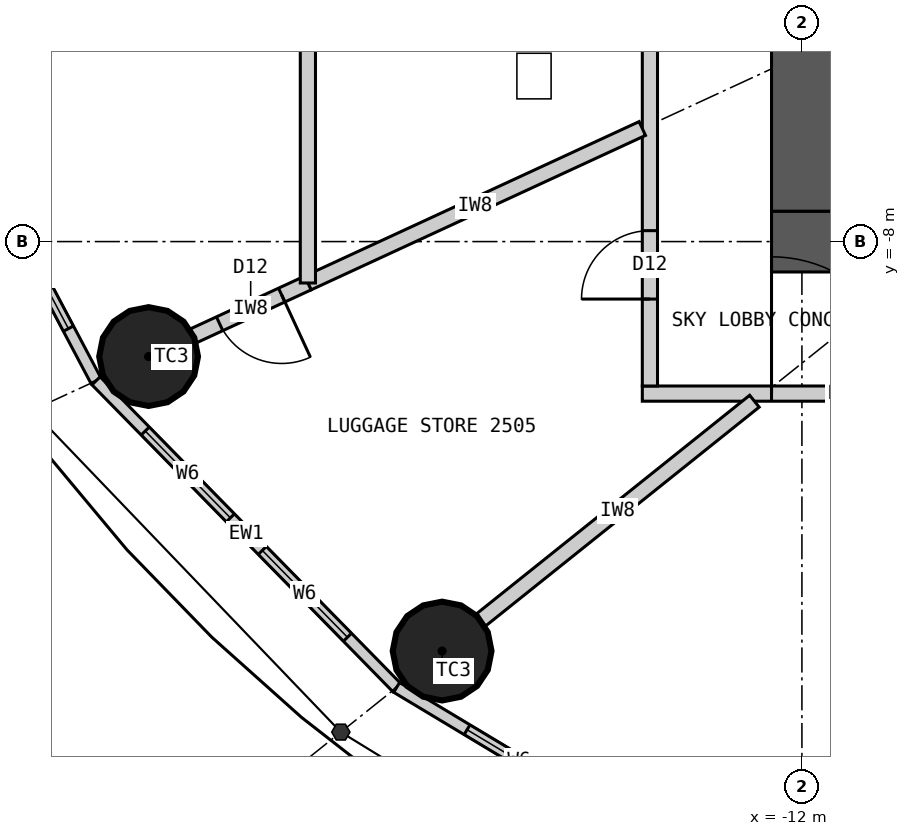
"""IFC4 building model, lengths in metres.
Left out: names, types, materials, properties, quantities, classifications, styles, units other than length and angle.
Written with IfcOpenShell. Run it as: python <this file> out.ifc"""

import sys

from ifc_helpers import new_model, si_unit, direction, frame, frame_2d, origin, origin_2d, place, context, subcontext, project, spatial, rectangle, circle, extrude, element, fill, save


model = new_model("IFC4")
c1 = context("Model", 3, precision=1e-05, world=origin(), true_north=direction((0.0, 1.0)))
c2 = subcontext(c1, "Body", "Model", "MODEL_VIEW")
j1 = project(units=[si_unit("LENGTHUNIT", "METRE"), si_unit("PLANEANGLEUNIT", "RADIAN")], contexts=[c1])
p1 = place(None, origin())
s1 = spatial("IfcSite", under=j1, at=p1, CompositionType="ELEMENT")
p2 = place(p1, origin())
s2 = spatial("IfcBuilding", under=s1, at=p2, CompositionType="ELEMENT")
p3 = place(p2, frame((0.0, 0.0, 100.2)))
s3 = spatial("IfcBuildingStorey", under=s2, at=p3, CompositionType="ELEMENT", Elevation=100.2)
for number, where, z_axis, x_axis in (
    (1, (-20.596, -9.513, 0.0), (0.0, 0.0, 1.0), (1.0, 0.0, 0.0)),
    (2, (-16.734, -13.387, 0.0), (0.0, 0.0, 1.0), (1.0, 0.0, 0.0)),
):
    element("IfcColumn", number, at=place(p3, frame(where, z_axis=z_axis, x_axis=x_axis)), inside=s3, PredefinedType="COLUMN", context=c2, shape_type="SweptSolid", body=[
        extrude(circle(Radius=0.65, at=origin_2d()), origin(), (0.0, 0.0, 1.0), 5.4),
    ])
p4 = place(p3, frame((12.4, -8.0, 0.0), z_axis=(0.0, 0.0, 1.0), x_axis=(-1.0, 0.0, 0.0)))
e3 = element("IfcWall", 3, at=p4, inside=s3, PredefinedType="SHEAR", context=c2, shape_type="SweptSolid", body=[
    extrude(rectangle(XDim=24.8, YDim=0.8, at=frame_2d((12.4, 0.0))), origin(), (0.0, 0.0, 1.0), 5.4),
])
p5 = place(p4, frame((11.1, 0.0, 0.0)))
e4 = element("IfcOpeningElement", 4, at=p5, cuts=e3, PredefinedType="OPENING", context=c2, shape_type="SweptSolid", body=[
    extrude(rectangle(XDim=1.2, YDim=2.2, at=frame_2d((0.6, 1.1))), frame((0.0, 0.41, 0.0), z_axis=(0.0, -1.0, 0.0), x_axis=(1.0, 0.0, 0.0)), (0.0, 0.0, 1.0), 0.82),
])
p6 = place(p4, frame((18.7, 0.0, 0.0)))
e5 = element("IfcOpeningElement", 5, at=p6, cuts=e3, PredefinedType="OPENING", context=c2, shape_type="SweptSolid", body=[
    extrude(rectangle(XDim=0.9, YDim=2.2, at=frame_2d((0.45, 1.1))), frame((0.0, 0.41, 0.0), z_axis=(0.0, -1.0, 0.0), x_axis=(1.0, 0.0, 0.0)), (0.0, 0.0, 1.0), 0.82),
])
p7 = place(p3, frame((-12.0, 7.6, 0.0), z_axis=(0.0, 0.0, 1.0), x_axis=(0.0, -1.0, 0.0)))
e6 = element("IfcWall", 6, at=p7, inside=s3, PredefinedType="SHEAR", context=c2, shape_type="SweptSolid", body=[
    extrude(rectangle(XDim=15.2, YDim=0.8, at=frame_2d((7.6, 0.0))), origin(), (0.0, 0.0, 1.0), 5.4),
])
p8 = place(p7, frame((6.7, 0.0, 0.0)))
e7 = element("IfcOpeningElement", 7, at=p8, cuts=e6, PredefinedType="OPENING", context=c2, shape_type="SweptSolid", body=[
    extrude(rectangle(XDim=1.8, YDim=2.2, at=frame_2d((0.9, 1.1))), frame((0.0, 0.41, 0.0), z_axis=(0.0, -1.0, 0.0), x_axis=(1.0, 0.0, 0.0)), (0.0, 0.0, 1.0), 0.82),
])
p9 = place(p3, frame((-23.792, -5.1, 0.0), z_axis=(0.0, 0.0, 1.0), x_axis=(0.467814388454, -0.883826735257, 0.0)))
e8 = element("IfcWall", 8, at=p9, inside=s3, PredefinedType="ELEMENTEDWALL", context=c2, shape_type="SweptSolid", body=[
    extrude(rectangle(XDim=5.354, YDim=0.15, at=frame_2d((2.677, 0.0))), origin(), (0.0, 0.0, 1.0), 5.22),
])
p10 = place(p9, frame((0.777, 0.0, 0.6)))
e9 = element("IfcOpeningElement", 9, at=p10, cuts=e8, PredefinedType="OPENING", context=c2, shape_type="SweptSolid", body=[
    extrude(rectangle(XDim=1.6, YDim=3.6, at=frame_2d((0.8, 1.8))), frame((0.0, 0.085, 0.0), z_axis=(0.0, -1.0, 0.0), x_axis=(1.0, 0.0, 0.0)), (0.0, 0.0, 1.0), 0.17),
])
p11 = place(p9, frame((2.977, 0.0, 0.6)))
e10 = element("IfcOpeningElement", 10, at=p11, cuts=e8, PredefinedType="OPENING", context=c2, shape_type="SweptSolid", body=[
    extrude(rectangle(XDim=1.6, YDim=3.6, at=frame_2d((0.8, 1.8))), frame((0.0, 0.085, 0.0), z_axis=(0.0, -1.0, 0.0), x_axis=(1.0, 0.0, 0.0)), (0.0, 0.0, 1.0), 0.17),
])
p12 = place(p3, frame((-21.287, -9.832, 0.0), z_axis=(0.0, 0.0, 1.0), x_axis=(0.700136650834, -0.714008872605, 0.0)))
e11 = element("IfcWall", 11, at=p12, inside=s3, PredefinedType="ELEMENTEDWALL", context=c2, shape_type="SweptSolid", body=[
    extrude(rectangle(XDim=5.649, YDim=0.15, at=frame_2d((2.825, 0.0))), origin(), (0.0, 0.0, 1.0), 5.22),
])
p13 = place(p12, frame((0.925, 0.0, 0.6)))
e12 = element("IfcOpeningElement", 12, at=p13, cuts=e11, PredefinedType="OPENING", context=c2, shape_type="SweptSolid", body=[
    extrude(rectangle(XDim=1.6, YDim=3.6, at=frame_2d((0.8, 1.8))), frame((0.0, 0.085, 0.0), z_axis=(0.0, -1.0, 0.0), x_axis=(1.0, 0.0, 0.0)), (0.0, 0.0, 1.0), 0.17),
])
p14 = place(p12, frame((3.125, 0.0, 0.6)))
e13 = element("IfcOpeningElement", 13, at=p14, cuts=e11, PredefinedType="OPENING", context=c2, shape_type="SweptSolid", body=[
    extrude(rectangle(XDim=1.6, YDim=3.6, at=frame_2d((0.8, 1.8))), frame((0.0, 0.085, 0.0), z_axis=(0.0, -1.0, 0.0), x_axis=(1.0, 0.0, 0.0)), (0.0, 0.0, 1.0), 0.17),
])
p15 = place(p3, frame((-17.332, -13.866, 0.0), z_axis=(0.0, 0.0, 1.0), x_axis=(0.857308573723, -0.514802884044, 0.0)))
e14 = element("IfcWall", 14, at=p15, inside=s3, PredefinedType="ELEMENTEDWALL", context=c2, shape_type="SweptSolid", body=[
    extrude(rectangle(XDim=5.961, YDim=0.15, at=frame_2d((2.98, 0.0))), origin(), (0.0, 0.0, 1.0), 5.22),
])
p16 = place(p15, frame((1.081, 0.0, 0.6)))
e15 = element("IfcOpeningElement", 15, at=p16, cuts=e14, PredefinedType="OPENING", context=c2, shape_type="SweptSolid", body=[
    extrude(rectangle(XDim=1.6, YDim=3.6, at=frame_2d((0.8, 1.8))), frame((0.0, 0.085, 0.0), z_axis=(0.0, -1.0, 0.0), x_axis=(1.0, 0.0, 0.0)), (0.0, 0.0, 1.0), 0.17),
])
p17 = place(p15, frame((3.281, 0.0, 0.6)))
e16 = element("IfcOpeningElement", 16, at=p17, cuts=e14, PredefinedType="OPENING", context=c2, shape_type="SweptSolid", body=[
    extrude(rectangle(XDim=1.6, YDim=3.6, at=frame_2d((0.8, 1.8))), frame((0.0, 0.085, 0.0), z_axis=(0.0, -1.0, 0.0), x_axis=(1.0, 0.0, 0.0)), (0.0, 0.0, 1.0), 0.17),
])
p18 = place(p3, frame((14.1, -10.0, 0.0), z_axis=(0.0, 0.0, 1.0), x_axis=(-1.0, 0.0, 0.0)))
e17 = element("IfcWall", 17, at=p18, inside=s3, PredefinedType="PARTITIONING", context=c2, shape_type="SweptSolid", body=[
    extrude(rectangle(XDim=28.2, YDim=0.2, at=frame_2d((14.1, 0.0))), origin(), (0.0, 0.0, 1.0), 5.22),
])
p19 = place(p18, frame((13.2, 0.0, 0.0)))
e18 = element("IfcOpeningElement", 18, at=p19, cuts=e17, PredefinedType="OPENING", context=c2, shape_type="SweptSolid", body=[
    extrude(rectangle(XDim=1.8, YDim=2.4, at=frame_2d((0.9, 1.2))), frame((0.0, 0.11, 0.0), z_axis=(0.0, -1.0, 0.0), x_axis=(1.0, 0.0, 0.0)), (0.0, 0.0, 1.0), 0.22),
])
p20 = place(p18, frame((24.7, 0.0, 0.0)))
e19 = element("IfcOpeningElement", 19, at=p20, cuts=e17, PredefinedType="OPENING", context=c2, shape_type="SweptSolid", body=[
    extrude(rectangle(XDim=1.8, YDim=2.4, at=frame_2d((0.9, 1.2))), frame((0.0, 0.11, 0.0), z_axis=(0.0, -1.0, 0.0), x_axis=(1.0, 0.0, 0.0)), (0.0, 0.0, 1.0), 0.22),
])
p21 = place(p3, frame((-14.0, 9.9, 0.0), z_axis=(0.0, 0.0, 1.0), x_axis=(0.0, -1.0, 0.0)))
e20 = element("IfcWall", 20, at=p21, inside=s3, PredefinedType="PARTITIONING", context=c2, shape_type="SweptSolid", body=[
    extrude(rectangle(XDim=19.8, YDim=0.2, at=frame_2d((9.9, 0.0))), origin(), (0.0, 0.0, 1.0), 5.22),
])
p22 = place(p21, frame((2.889, 0.0, 0.0)))
e21 = element("IfcOpeningElement", 21, at=p22, cuts=e20, PredefinedType="OPENING", context=c2, shape_type="SweptSolid", body=[
    extrude(rectangle(XDim=0.9, YDim=2.1, at=frame_2d((0.45, 1.05))), frame((0.0, 0.11, 0.0), z_axis=(0.0, -1.0, 0.0), x_axis=(1.0, 0.0, 0.0)), (0.0, 0.0, 1.0), 0.22),
])
p23 = place(p21, frame((9.45, 0.0, 0.0)))
e22 = element("IfcOpeningElement", 22, at=p23, cuts=e20, PredefinedType="OPENING", context=c2, shape_type="SweptSolid", body=[
    extrude(rectangle(XDim=0.9, YDim=2.1, at=frame_2d((0.45, 1.05))), frame((0.0, 0.11, 0.0), z_axis=(0.0, -1.0, 0.0), x_axis=(1.0, 0.0, 0.0)), (0.0, 0.0, 1.0), 0.22),
])
p24 = place(p21, frame((14.167, 0.0, 0.0)))
e23 = element("IfcOpeningElement", 23, at=p24, cuts=e20, PredefinedType="OPENING", context=c2, shape_type="SweptSolid", body=[
    extrude(rectangle(XDim=1.0, YDim=2.2, at=frame_2d((0.5, 1.1))), frame((0.0, 0.11, 0.0), z_axis=(0.0, -1.0, 0.0), x_axis=(1.0, 0.0, 0.0)), (0.0, 0.0, 1.0), 0.22),
])
p25 = place(p21, frame((17.756, 0.0, 0.0)))
e24 = element("IfcOpeningElement", 24, at=p25, cuts=e20, PredefinedType="OPENING", context=c2, shape_type="SweptSolid", body=[
    extrude(rectangle(XDim=0.9, YDim=2.2, at=frame_2d((0.45, 1.1))), frame((0.0, 0.11, 0.0), z_axis=(0.0, -1.0, 0.0), x_axis=(1.0, 0.0, 0.0)), (0.0, 0.0, 1.0), 0.22),
])
p26 = place(p3, frame((-14.1, -6.512, 0.0), z_axis=(0.0, 0.0, 1.0), x_axis=(-0.907841399505, -0.419313717095, 0.0)))
e25 = element("IfcWall", 25, at=p26, inside=s3, PredefinedType="PARTITIONING", context=c2, shape_type="SweptSolid", body=[
    extrude(rectangle(XDim=4.846, YDim=0.2, at=frame_2d((2.423, 0.0))), origin(), (0.0, 0.0, 1.0), 5.22),
])
p27 = place(p3, frame((-18.5, -8.545, 0.0), z_axis=(0.0, 0.0, 1.0), x_axis=(-0.907808531132, -0.41938487193, 0.0)))
e26 = element("IfcWall", 26, at=p27, inside=s3, PredefinedType="PARTITIONING", context=c2, shape_type="SweptSolid", body=[
    extrude(rectangle(XDim=1.658, YDim=0.2, at=frame_2d((0.829, 0.0))), origin(), (0.0, 0.0, 1.0), 4.32),
])
p28 = place(p27, frame((0.379, 0.0, 0.0)))
e27 = element("IfcOpeningElement", 27, at=p28, cuts=e26, PredefinedType="OPENING", context=c2, shape_type="SweptSolid", body=[
    extrude(rectangle(XDim=0.9, YDim=2.2, at=frame_2d((0.45, 1.1))), frame((0.0, 0.11, 0.0), z_axis=(0.0, -1.0, 0.0), x_axis=(1.0, 0.0, 0.0)), (0.0, 0.0, 1.0), 0.22),
])
p29 = place(p3, frame((-12.625, -10.1, 0.0), z_axis=(0.0, 0.0, 1.0), x_axis=(-0.780863644897, -0.624701503182, 0.0)))
e28 = element("IfcWall", 28, at=p29, inside=s3, PredefinedType="PARTITIONING", context=c2, shape_type="SweptSolid", body=[
    extrude(rectangle(XDim=4.612, YDim=0.2, at=frame_2d((2.306, 0.0))), origin(), (0.0, 0.0, 1.0), 4.37),
])
p30 = place(p3, frame((-18.5, 11.809, 0.0), z_axis=(0.0, 0.0, 1.0), x_axis=(0.0, -1.0, 0.0)))
e29 = element("IfcWall", 29, at=p30, inside=s3, PredefinedType="PARTITIONING", context=c2, shape_type="SweptSolid", body=[
    extrude(rectangle(XDim=20.354, YDim=0.2, at=frame_2d((10.177, 0.0))), origin(), (0.0, 0.0, 1.0), 5.22),
])
p31 = place(p11, origin())
e30 = element("IfcWindow", 30, at=p31, inside=s3, PartitioningType="SINGLE_PANEL", PredefinedType="WINDOW", context=c2, shape_type="SweptSolid", body=[
    extrude(rectangle(XDim=1.6, YDim=3.6, at=frame_2d((0.8, 1.8))), frame((0.0, 0.03, 0.0), z_axis=(0.0, -1.0, 0.0), x_axis=(1.0, 0.0, 0.0)), (0.0, 0.0, 1.0), 0.06),
])
fill(e10, e30)
p32 = place(p13, origin())
e31 = element("IfcWindow", 31, at=p32, inside=s3, PartitioningType="SINGLE_PANEL", PredefinedType="WINDOW", context=c2, shape_type="SweptSolid", body=[
    extrude(rectangle(XDim=1.6, YDim=3.6, at=frame_2d((0.8, 1.8))), frame((0.0, 0.03, 0.0), z_axis=(0.0, -1.0, 0.0), x_axis=(1.0, 0.0, 0.0)), (0.0, 0.0, 1.0), 0.06),
])
fill(e12, e31)
p33 = place(p14, origin())
e32 = element("IfcWindow", 32, at=p33, inside=s3, PartitioningType="SINGLE_PANEL", PredefinedType="WINDOW", context=c2, shape_type="SweptSolid", body=[
    extrude(rectangle(XDim=1.6, YDim=3.6, at=frame_2d((0.8, 1.8))), frame((0.0, 0.03, 0.0), z_axis=(0.0, -1.0, 0.0), x_axis=(1.0, 0.0, 0.0)), (0.0, 0.0, 1.0), 0.06),
])
fill(e13, e32)
p34 = place(p16, origin())
e33 = element("IfcWindow", 33, at=p34, inside=s3, PartitioningType="SINGLE_PANEL", PredefinedType="WINDOW", context=c2, shape_type="SweptSolid", body=[
    extrude(rectangle(XDim=1.6, YDim=3.6, at=frame_2d((0.8, 1.8))), frame((0.0, 0.03, 0.0), z_axis=(0.0, -1.0, 0.0), x_axis=(1.0, 0.0, 0.0)), (0.0, 0.0, 1.0), 0.06),
])
fill(e15, e33)
p35 = place(p25, origin())
e34 = element("IfcDoor", 34, at=p35, inside=s3, OperationType="SINGLE_SWING_RIGHT", PredefinedType="DOOR", context=c2, shape_type="SweptSolid", body=[
    extrude(rectangle(XDim=0.9, YDim=2.2, at=frame_2d((0.45, 1.1))), frame((0.0, 0.025, 0.0), z_axis=(0.0, -1.0, 0.0), x_axis=(1.0, 0.0, 0.0)), (0.0, 0.0, 1.0), 0.05),
])
fill(e24, e34)
p36 = place(p28, origin())
e35 = element("IfcDoor", 35, at=p36, inside=s3, OperationType="SINGLE_SWING_LEFT", PredefinedType="DOOR", context=c2, shape_type="SweptSolid", body=[
    extrude(rectangle(XDim=0.9, YDim=2.2, at=frame_2d((0.45, 1.1))), frame((0.0, 0.025, 0.0), z_axis=(0.0, -1.0, 0.0), x_axis=(1.0, 0.0, 0.0)), (0.0, 0.0, 1.0), 0.05),
])
fill(e27, e35)
p37 = place(p20, origin())
e36 = element("IfcDoor", 36, at=p37, inside=s3, OperationType="DOUBLE_DOOR_DOUBLE_SWING", PredefinedType="DOOR", context=c2, shape_type="SweptSolid", body=[
    extrude(rectangle(XDim=1.8, YDim=2.4, at=frame_2d((0.9, 1.2))), frame((0.0, 0.025, 0.0), z_axis=(0.0, -1.0, 0.0), x_axis=(1.0, 0.0, 0.0)), (0.0, 0.0, 1.0), 0.05),
])
fill(e19, e36)
save(model, sys.argv[1])
